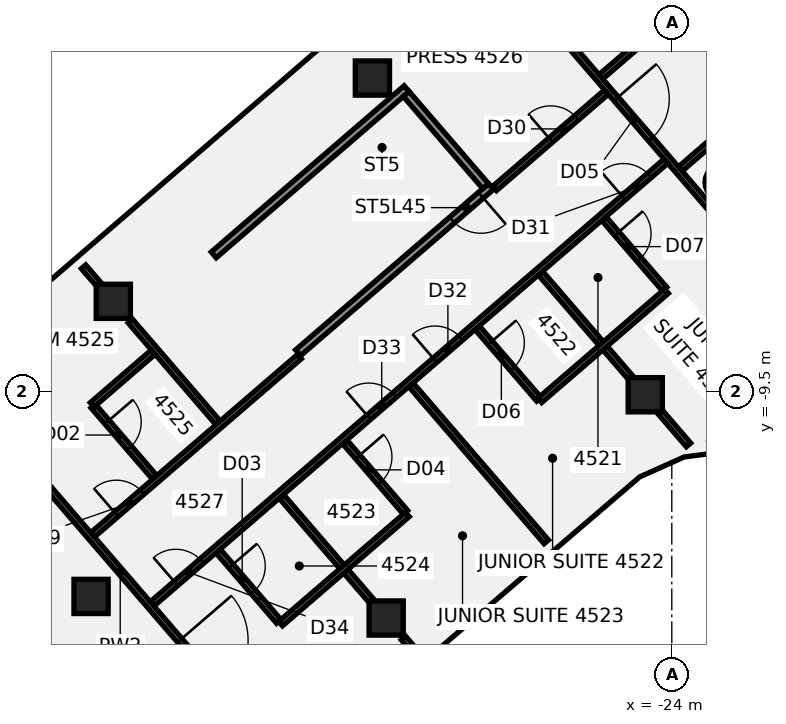
"""IFC4 building model, lengths in metres.
Left out: names, types, materials, properties, quantities, classifications, styles, units other than length and angle.
Written with IfcOpenShell. Run it as: python <this file> out.ifc"""

import sys

from ifc_helpers import new_model, si_unit, direction, frame, frame_2d, origin, origin_2d, place, context, subcontext, project, spatial, polyline, rectangle, circle, outline, extrude, element, fill, save


model = new_model("IFC4")
c1 = context("Model", 3, precision=1e-05, world=origin(), true_north=direction((0.0, 1.0)))
c2 = subcontext(c1, "Body", "Model", "MODEL_VIEW")
j1 = project(units=[si_unit("LENGTHUNIT", "METRE"), si_unit("PLANEANGLEUNIT", "RADIAN")], contexts=[c1])
p1 = place(None, origin())
s1 = spatial("IfcSite", under=j1, at=p1, CompositionType="ELEMENT")
p2 = place(p1, origin())
s2 = spatial("IfcBuilding", under=s1, at=p2, CompositionType="ELEMENT")
p3 = place(p2, frame((0.0, 0.0, 182.5)))
s3 = spatial("IfcBuildingStorey", under=s2, at=p3, CompositionType="ELEMENT", Elevation=182.5)
p4 = place(p3, frame((-22.651, -3.994, -0.14), z_axis=(0.0, 0.0, 1.0), x_axis=(1.0, 0.0, 0.0)))
e1 = element("IfcColumn", 1, at=p4, inside=s3, PredefinedType="COLUMN", context=c2, shape_type="SweptSolid", body=[
    extrude(circle(Radius=0.475, at=origin_2d()), origin(), (0.0, 0.0, 1.0), 3.6),
])
p5 = place(p3, frame((-31.516, -15.459, -0.133), z_axis=(0.07839124964, -0.047319070379, 0.995799034725), x_axis=(-0.649009542698, 0.755788776181, 0.087005398028)))
e2 = element("IfcColumn", 2, at=p5, inside=s3, PredefinedType="COLUMN", context=c2, shape_type="SweptSolid", body=[
    extrude(rectangle(XDim=0.9, YDim=0.9, at=origin_2d()), origin(), (0.0, 0.0, 1.0), 3.606),
])
p6 = place(p3, frame((-38.696, -7.126, -0.133), z_axis=(0.036686006843, -0.083863399406, 0.995801720797), x_axis=(0.758162598415, 0.651508924479, 0.026936883435)))
e3 = element("IfcColumn", 3, at=p6, inside=s3, PredefinedType="COLUMN", context=c2, shape_type="SweptSolid", body=[
    extrude(rectangle(XDim=0.9, YDim=0.9, at=origin_2d()), origin(), (0.0, 0.0, 1.0), 3.607),
])
p7 = place(p3, frame((-24.698, -9.584, -0.135), z_axis=(0.048576320124, -0.013229584391, 0.998731855515), x_axis=(-0.651247732409, 0.757717932984, 0.04171240903)))
e4 = element("IfcColumn", 4, at=p7, inside=s3, PredefinedType="COLUMN", context=c2, shape_type="SweptSolid", body=[
    extrude(rectangle(XDim=0.9, YDim=0.9, at=origin_2d()), origin(), (0.0, 0.0, 1.0), 3.599),
])
p8 = place(p3, frame((-31.878, -1.251, -0.135), z_axis=(0.006783926741, -0.049929700814, 0.99872969482), x_axis=(0.757710068374, 0.652013787216, 0.027449472935)))
e5 = element("IfcColumn", 5, at=p8, inside=s3, PredefinedType="COLUMN", context=c2, shape_type="SweptSolid", body=[
    extrude(rectangle(XDim=0.9, YDim=0.9, at=origin_2d()), origin(), (0.0, 0.0, 1.0), 3.599),
])
p9 = place(p3, frame((-39.281, -14.891, -0.126), z_axis=(0.12637463351, -0.040639705862, 0.99114976987), x_axis=(-0.645550569996, 0.755269902041, 0.113277697048)))
e6 = element("IfcColumn", 6, at=p9, inside=s3, PredefinedType="COLUMN", context=c2, shape_type="SweptSolid", body=[
    extrude(rectangle(XDim=0.9, YDim=0.9, at=origin_2d()), origin(), (0.0, 0.0, 1.0), 3.616),
])
p10 = place(p3, frame((-42.888, -9.154, 0.0), z_axis=(0.0, 0.0, 1.0), x_axis=(0.652715459728, -0.75760314719, 0.0)))
e7 = element("IfcWall", 7, at=p10, inside=s3, PredefinedType="PARTITIONING", context=c2, shape_type="SweptSolid", body=[
    extrude(rectangle(XDim=13.403, YDim=0.15, at=frame_2d((6.701, 0.0))), origin(), (0.0, 0.0, 1.0), 2.864),
])
p11 = place(p10, frame((9.099, 0.0, 0.0)))
e8 = element("IfcOpeningElement", 8, at=p11, cuts=e7, PredefinedType="OPENING", context=c2, shape_type="SweptSolid", body=[
    extrude(rectangle(XDim=1.8, YDim=2.1, at=frame_2d((0.9, 1.05))), frame((0.0, 0.085, 0.0), z_axis=(0.0, -1.0, 0.0), x_axis=(1.0, 0.0, 0.0)), (0.0, 0.0, 1.0), 0.17),
])
p12 = place(p3, frame((-39.479, -6.217, 0.0), z_axis=(0.0, 0.0, 1.0), x_axis=(0.652651234918, -0.757658475541, 0.0)))
e9 = element("IfcWall", 9, at=p12, inside=s3, PredefinedType="PARTITIONING", context=c2, shape_type="SweptSolid", body=[
    extrude(rectangle(XDim=0.821, YDim=0.15, at=frame_2d((0.41, 0.0))), origin(), (0.0, 0.0, 1.0), 2.864),
])
p13 = place(p3, frame((-38.248, -7.646, 0.0), z_axis=(0.0, 0.0, 1.0), x_axis=(0.652741368874, -0.757580824309, 0.0)))
e10 = element("IfcWall", 10, at=p13, inside=s3, PredefinedType="PARTITIONING", context=c2, shape_type="SweptSolid", body=[
    extrude(rectangle(XDim=3.533, YDim=0.15, at=frame_2d((1.766, 0.0))), origin(), (0.0, 0.0, 1.0), 2.864),
])
p14 = place(p3, frame((-34.271, -12.262, 0.0), z_axis=(0.0, 0.0, 1.0), x_axis=(0.652795291218, -0.757534360781, 0.0)))
e11 = element("IfcWall", 11, at=p14, inside=s3, PredefinedType="PARTITIONING", context=c2, shape_type="SweptSolid", body=[
    extrude(rectangle(XDim=3.848, YDim=0.15, at=frame_2d((1.924, 0.0))), origin(), (0.0, 0.0, 1.0), 2.864),
])
p15 = place(p3, frame((-31.063, -15.984, 0.0), z_axis=(0.0, 0.0, 1.0), x_axis=(0.652709025629, -0.757608690462, 0.0)))
e12 = element("IfcWall", 12, at=p15, inside=s3, PredefinedType="PARTITIONING", context=c2, shape_type="SweptSolid", body=[
    extrude(rectangle(XDim=0.524, YDim=0.15, at=frame_2d((0.262, 0.0))), origin(), (0.0, 0.0, 1.0), 2.864),
])
p16 = place(p3, frame((-39.227, -9.879, 0.0), z_axis=(0.0, 0.0, 1.0), x_axis=(0.652686423647, -0.757628162351, 0.0)))
e13 = element("IfcWall", 13, at=p16, inside=s3, PredefinedType="PARTITIONING", context=c2, shape_type="SweptSolid", body=[
    extrude(rectangle(XDim=2.48, YDim=0.15, at=frame_2d((1.24, 0.0))), origin(), (0.0, 0.0, 1.0), 2.864),
])
p17 = place(p16, frame((0.56, 0.0, 0.0)))
e14 = element("IfcOpeningElement", 14, at=p17, cuts=e13, PredefinedType="OPENING", context=c2, shape_type="SweptSolid", body=[
    extrude(rectangle(XDim=0.9, YDim=2.1, at=frame_2d((0.45, 1.05))), frame((0.0, 0.085, 0.0), z_axis=(0.0, -1.0, 0.0), x_axis=(1.0, 0.0, 0.0)), (0.0, 0.0, 1.0), 0.17),
])
p18 = place(p3, frame((-35.938, -13.698, 0.0), z_axis=(0.0, 0.0, 1.0), x_axis=(0.652688747073, -0.757626160745, 0.0)))
e15 = element("IfcWall", 15, at=p18, inside=s3, PredefinedType="PARTITIONING", context=c2, shape_type="SweptSolid", body=[
    extrude(rectangle(XDim=2.445, YDim=0.15, at=frame_2d((1.223, 0.0))), origin(), (0.0, 0.0, 1.0), 2.864),
])
p19 = place(p18, frame((0.52, 0.0, 0.0)))
e16 = element("IfcOpeningElement", 16, at=p19, cuts=e15, PredefinedType="OPENING", context=c2, shape_type="SweptSolid", body=[
    extrude(rectangle(XDim=0.9, YDim=2.1, at=frame_2d((0.45, 1.05))), frame((0.0, 0.085, 0.0), z_axis=(0.0, -1.0, 0.0), x_axis=(1.0, 0.0, 0.0)), (0.0, 0.0, 1.0), 0.17),
])
p20 = place(p3, frame((-32.604, -10.826, 0.0), z_axis=(0.0, 0.0, 1.0), x_axis=(0.652688747073, -0.757626160745, 0.0)))
e17 = element("IfcWall", 17, at=p20, inside=s3, PredefinedType="PARTITIONING", context=c2, shape_type="SweptSolid", body=[
    extrude(rectangle(XDim=2.445, YDim=0.15, at=frame_2d((1.223, 0.0))), origin(), (0.0, 0.0, 1.0), 2.864),
])
p21 = place(p20, frame((0.52, 0.0, 0.0)))
e18 = element("IfcOpeningElement", 18, at=p21, cuts=e17, PredefinedType="OPENING", context=c2, shape_type="SweptSolid", body=[
    extrude(rectangle(XDim=0.9, YDim=2.1, at=frame_2d((0.45, 1.05))), frame((0.0, 0.085, 0.0), z_axis=(0.0, -1.0, 0.0), x_axis=(1.0, 0.0, 0.0)), (0.0, 0.0, 1.0), 0.17),
])
p22 = place(p3, frame((-30.862, -9.325, 0.0), z_axis=(0.0, 0.0, 1.0), x_axis=(0.652740266832, -0.757581773841, 0.0)))
e19 = element("IfcWall", 19, at=p22, inside=s3, PredefinedType="PARTITIONING", context=c2, shape_type="SweptSolid", body=[
    extrude(rectangle(XDim=5.451, YDim=0.15, at=frame_2d((2.726, 0.0))), origin(), (0.0, 0.0, 1.0), 2.864),
])
p23 = place(p3, frame((-29.251, 2.595, 0.0), z_axis=(0.0, 0.0, 1.0), x_axis=(0.652713725704, -0.757604641141, 0.0)))
e20 = element("IfcWall", 20, at=p23, inside=s3, PredefinedType="PARTITIONING", context=c2, shape_type="SweptSolid", body=[
    extrude(rectangle(XDim=14.219, YDim=0.15, at=frame_2d((7.109, 0.0))), origin(), (0.0, 0.0, 1.0), 2.864),
])
p24 = place(p23, frame((5.799, 0.0, 0.0)))
e21 = element("IfcOpeningElement", 21, at=p24, cuts=e20, PredefinedType="OPENING", context=c2, shape_type="SweptSolid", body=[
    extrude(rectangle(XDim=1.4, YDim=2.1, at=frame_2d((0.7, 1.05))), frame((0.0, 0.085, 0.0), z_axis=(0.0, -1.0, 0.0), x_axis=(1.0, 0.0, 0.0)), (0.0, 0.0, 1.0), 0.17),
])
p25 = place(p3, frame((-29.119, -7.823, 0.0), z_axis=(0.0, 0.0, 1.0), x_axis=(0.652888980145, -0.757453615481, 0.0)))
e22 = element("IfcWall", 22, at=p25, inside=s3, PredefinedType="PARTITIONING", context=c2, shape_type="SweptSolid", body=[
    extrude(rectangle(XDim=2.479, YDim=0.15, at=frame_2d((1.24, 0.0))), origin(), (0.0, 0.0, 1.0), 2.864),
])
p26 = place(p25, frame((0.52, 0.0, 0.0)))
e23 = element("IfcOpeningElement", 23, at=p26, cuts=e22, PredefinedType="OPENING", context=c2, shape_type="SweptSolid", body=[
    extrude(rectangle(XDim=0.9, YDim=2.1, at=frame_2d((0.45, 1.05))), frame((0.0, 0.085, 0.0), z_axis=(0.0, -1.0, 0.0), x_axis=(1.0, 0.0, 0.0)), (0.0, 0.0, 1.0), 0.17),
])
p27 = place(p3, frame((-27.453, -6.388, 0.0), z_axis=(0.0, 0.0, 1.0), x_axis=(0.652892175674, -0.757450861075, 0.0)))
e24 = element("IfcWall", 24, at=p27, inside=s3, PredefinedType="PARTITIONING", context=c2, shape_type="SweptSolid", body=[
    extrude(rectangle(XDim=3.766, YDim=0.15, at=frame_2d((1.883, 0.0))), origin(), (0.0, 0.0, 1.0), 2.864),
])
p28 = place(p3, frame((-24.299, -10.048, 0.0), z_axis=(0.0, 0.0, 1.0), x_axis=(0.652995188074, -0.75736205632, 0.0)))
e25 = element("IfcWall", 25, at=p28, inside=s3, PredefinedType="PARTITIONING", context=c2, shape_type="SweptSolid", body=[
    extrude(rectangle(XDim=1.13, YDim=0.15, at=frame_2d((0.565, 0.0))), origin(), (0.0, 0.0, 1.0), 2.864),
])
p29 = place(p3, frame((-25.786, -4.952, 0.0), z_axis=(0.0, 0.0, 1.0), x_axis=(0.652886276294, -0.757455946063, 0.0)))
e26 = element("IfcWall", 26, at=p29, inside=s3, PredefinedType="PARTITIONING", context=c2, shape_type="SweptSolid", body=[
    extrude(rectangle(XDim=2.444, YDim=0.15, at=frame_2d((1.222, 0.0))), origin(), (0.0, 0.0, 1.0), 2.864),
])
p30 = place(p29, frame((0.52, 0.0, 0.0)))
e27 = element("IfcOpeningElement", 27, at=p30, cuts=e26, PredefinedType="OPENING", context=c2, shape_type="SweptSolid", body=[
    extrude(rectangle(XDim=0.9, YDim=2.1, at=frame_2d((0.45, 1.05))), frame((0.0, 0.085, 0.0), z_axis=(0.0, -1.0, 0.0), x_axis=(1.0, 0.0, 0.0)), (0.0, 0.0, 1.0), 0.17),
])
p31 = place(p3, frame((-39.238, -13.268, 0.0), z_axis=(0.0, 0.0, 1.0), x_axis=(0.757588514566, 0.652732443346, 0.0)))
e28 = element("IfcWall", 28, at=p31, inside=s3, PredefinedType="PARTITIONING", context=c2, shape_type="SweptSolid", body=[
    extrude(rectangle(XDim=7.181, YDim=0.15, at=frame_2d((3.59, 0.0))), origin(), (0.0, 0.0, 1.0), 2.864),
])
p32 = place(p31, frame((0.82, 0.0, 0.0)))
e29 = element("IfcOpeningElement", 29, at=p32, cuts=e28, PredefinedType="OPENING", context=c2, shape_type="SweptSolid", body=[
    extrude(rectangle(XDim=0.9, YDim=2.1, at=frame_2d((0.45, 1.05))), frame((0.0, 0.085, 0.0), z_axis=(0.0, -1.0, 0.0), x_axis=(1.0, 0.0, 0.0)), (0.0, 0.0, 1.0), 0.17),
])
p33 = place(p3, frame((-28.663, -4.156, 0.0), z_axis=(0.0, 0.0, 1.0), x_axis=(0.757628792985, 0.652685691615, 0.0)))
e30 = element("IfcWall", 30, at=p33, inside=s3, PredefinedType="PARTITIONING", context=c2, shape_type="SweptSolid", body=[
    extrude(rectangle(XDim=3.88, YDim=0.15, at=frame_2d((1.94, 0.0))), origin(), (0.0, 0.0, 1.0), 2.864),
])
p34 = place(p33, frame((1.95, 0.0, 0.0)))
e31 = element("IfcOpeningElement", 31, at=p34, cuts=e30, PredefinedType="OPENING", context=c2, shape_type="SweptSolid", body=[
    extrude(rectangle(XDim=0.9, YDim=2.1, at=frame_2d((0.45, 1.05))), frame((0.0, 0.085, 0.0), z_axis=(0.0, -1.0, 0.0), x_axis=(1.0, 0.0, 0.0)), (0.0, 0.0, 1.0), 0.17),
])
p35 = place(p3, frame((-39.253, -9.849, 0.0), z_axis=(0.0, 0.0, 1.0), x_axis=(0.757358886991, 0.652998863932, 0.0)))
e32 = element("IfcWall", 32, at=p35, inside=s3, PredefinedType="PARTITIONING", context=c2, shape_type="SweptSolid", body=[
    extrude(rectangle(XDim=2.119, YDim=0.15, at=frame_2d((1.06, 0.0))), origin(), (0.0, 0.0, 1.0), 2.864),
])
p36 = place(p3, frame((-37.671, -15.086, 0.0), z_axis=(0.0, 0.0, 1.0), x_axis=(0.757564439781, 0.652760384505, 0.0)))
e33 = element("IfcWall", 33, at=p36, inside=s3, PredefinedType="PARTITIONING", context=c2, shape_type="SweptSolid", body=[
    extrude(rectangle(XDim=17.839, YDim=0.15, at=frame_2d((8.92, 0.0))), origin(), (0.0, 0.0, 1.0), 2.864),
])
p37 = place(p36, frame((16.369, 0.0, 0.0)))
e34 = element("IfcOpeningElement", 34, at=p37, cuts=e33, PredefinedType="OPENING", context=c2, shape_type="SweptSolid", body=[
    extrude(rectangle(XDim=0.9, YDim=2.1, at=frame_2d((0.45, 1.05))), frame((0.0, 0.085, 0.0), z_axis=(0.0, -1.0, 0.0), x_axis=(1.0, 0.0, 0.0)), (0.0, 0.0, 1.0), 0.17),
])
p38 = place(p36, frame((9.819, 0.0, 0.0)))
e35 = element("IfcOpeningElement", 35, at=p38, cuts=e33, PredefinedType="OPENING", context=c2, shape_type="SweptSolid", body=[
    extrude(rectangle(XDim=0.9, YDim=2.1, at=frame_2d((0.45, 1.05))), frame((0.0, 0.085, 0.0), z_axis=(0.0, -1.0, 0.0), x_axis=(1.0, 0.0, 0.0)), (0.0, 0.0, 1.0), 0.17),
])
p39 = place(p36, frame((7.52, 0.0, 0.0)))
e36 = element("IfcOpeningElement", 36, at=p39, cuts=e33, PredefinedType="OPENING", context=c2, shape_type="SweptSolid", body=[
    extrude(rectangle(XDim=0.9, YDim=2.1, at=frame_2d((0.45, 1.05))), frame((0.0, 0.085, 0.0), z_axis=(0.0, -1.0, 0.0), x_axis=(1.0, 0.0, 0.0)), (0.0, 0.0, 1.0), 0.17),
])
p40 = place(p36, frame((0.82, 0.0, 0.0)))
e37 = element("IfcOpeningElement", 37, at=p40, cuts=e33, PredefinedType="OPENING", context=c2, shape_type="SweptSolid", body=[
    extrude(rectangle(XDim=0.9, YDim=2.1, at=frame_2d((0.45, 1.05))), frame((0.0, 0.085, 0.0), z_axis=(0.0, -1.0, 0.0), x_axis=(1.0, 0.0, 0.0)), (0.0, 0.0, 1.0), 0.17),
])
p41 = place(p3, frame((-34.293, -15.607, 0.0), z_axis=(0.0, 0.0, 1.0), x_axis=(0.757668202235, 0.652639943094, 0.0)))
e38 = element("IfcWall", 38, at=p41, inside=s3, PredefinedType="PARTITIONING", context=c2, shape_type="SweptSolid", body=[
    extrude(rectangle(XDim=4.4, YDim=0.15, at=frame_2d((2.2, 0.0))), origin(), (0.0, 0.0, 1.0), 2.864),
])
p42 = place(p3, frame((-27.473, -9.732, 0.0), z_axis=(0.0, 0.0, 1.0), x_axis=(0.757652172853, 0.652658551595, 0.0)))
e39 = element("IfcWall", 39, at=p42, inside=s3, PredefinedType="PARTITIONING", context=c2, shape_type="SweptSolid", body=[
    extrude(rectangle(XDim=4.399, YDim=0.15, at=frame_2d((2.2, 0.0))), origin(), (0.0, 0.0, 1.0), 2.864),
])
p43 = place(p3, frame((-25.862, -1.216, 0.0), z_axis=(0.0, 0.0, 1.0), x_axis=(0.757576468923, 0.652746423762, 0.0)))
e40 = element("IfcWall", 40, at=p43, inside=s3, PredefinedType="PARTITIONING", context=c2, shape_type="SweptSolid", body=[
    extrude(rectangle(XDim=9.05, YDim=0.15, at=frame_2d((4.525, 0.0))), origin(), (0.0, 0.0, 1.0), 2.864),
])
p44 = place(p43, frame((5.17, 0.0, 0.0)))
e41 = element("IfcOpeningElement", 41, at=p44, cuts=e40, PredefinedType="OPENING", context=c2, shape_type="SweptSolid", body=[
    extrude(rectangle(XDim=0.9, YDim=2.1, at=frame_2d((0.45, 1.05))), frame((0.0, 0.085, 0.0), z_axis=(0.0, -1.0, 0.0), x_axis=(1.0, 0.0, 0.0)), (0.0, 0.0, 1.0), 0.17),
])
p45 = place(p3, frame((-23.774, -3.641, 0.0), z_axis=(0.0, 0.0, 1.0), x_axis=(0.757583902186, 0.65273779663, 0.0)))
e42 = element("IfcWall", 42, at=p45, inside=s3, PredefinedType="PARTITIONING", context=c2, shape_type="SweptSolid", body=[
    extrude(rectangle(XDim=6.294, YDim=0.15, at=frame_2d((3.147, 0.0))), origin(), (0.0, 0.0, 1.0), 2.864),
])
p46 = place(p3, frame((-28.758, -4.106, -0.14), z_axis=(0.0, 0.0, 1.0), x_axis=(-0.757613125952, -0.652703877257, 0.0)))
e43 = element("IfcWall", 43, at=p46, inside=s3, PredefinedType="SHEAR", context=c2, shape_type="SweptSolid", body=[
    extrude(rectangle(XDim=6.7, YDim=0.2, at=frame_2d((3.35, 0.0))), origin(), (0.0, 0.0, 1.0), 3.004),
])
p47 = place(p46, frame((0.35, 0.0, 0.0)))
e44 = element("IfcOpeningElement", 44, at=p47, cuts=e43, PredefinedType="OPENING", context=c2, shape_type="SweptSolid", body=[
    extrude(rectangle(XDim=1.0, YDim=2.1, at=frame_2d((0.5, 1.05))), frame((0.0, 0.11, 0.0), z_axis=(0.0, -1.0, 0.0), x_axis=(1.0, 0.0, 0.0)), (0.0, 0.0, 1.0), 0.22),
])
p48 = place(p3, frame((-30.977, -1.531, -0.14), z_axis=(0.0, 0.0, 1.0), x_axis=(-0.757595106879, -0.652724791955, 0.0)))
e45 = element("IfcWall", 45, at=p48, inside=s3, PredefinedType="SHEAR", context=c2, shape_type="SweptSolid", body=[
    extrude(rectangle(XDim=6.7, YDim=0.2, at=frame_2d((3.35, 0.0))), origin(), (0.0, 0.0, 1.0), 3.004),
])
p49 = place(p3, frame((-30.988, -1.672, -0.14), z_axis=(0.0, 0.0, 1.0), x_axis=(0.652749445371, -0.75757386542, 0.0)))
e46 = element("IfcWall", 46, at=p49, inside=s3, PredefinedType="SHEAR", context=c2, shape_type="SweptSolid", body=[
    extrude(rectangle(XDim=3.2, YDim=0.2, at=frame_2d((1.6, 0.0))), origin(), (0.0, 0.0, 1.0), 3.004),
])
p50 = place(p3, frame((0.0, 0.0, -0.14)))
e47 = element("IfcWall", 47, at=p50, inside=s3, PredefinedType="SHEAR", context=c2, shape_type="SweptSolid", body=[
    extrude(outline(polyline([(-35.836, -5.849), (-35.988, -5.979), (-33.899, -8.404), (-33.747, -8.273), (-35.836, -5.849)])), origin(), (0.0, 0.0, 1.0), 3.004),
])
p51 = place(p11, frame((1.8, 0.0, 0.0), z_axis=(0.0, 0.0, 1.0), x_axis=(-1.0, 0.0, 0.0)))
e48 = element("IfcDoor", 48, at=p51, inside=s3, OperationType="DOUBLE_DOOR_SINGLE_SWING", PredefinedType="DOOR", context=c2, shape_type="SweptSolid", body=[
    extrude(rectangle(XDim=1.8, YDim=2.1, at=frame_2d((0.9, 1.05))), frame((0.0, 0.025, 0.0), z_axis=(0.0, -1.0, 0.0), x_axis=(1.0, 0.0, 0.0)), (0.0, 0.0, 1.0), 0.05),
])
fill(e8, e48)
p52 = place(p17, origin())
e49 = element("IfcDoor", 49, at=p52, inside=s3, OperationType="SINGLE_SWING_RIGHT", PredefinedType="DOOR", context=c2, shape_type="SweptSolid", body=[
    extrude(rectangle(XDim=0.9, YDim=2.1, at=frame_2d((0.45, 1.05))), frame((0.0, 0.025, 0.0), z_axis=(0.0, -1.0, 0.0), x_axis=(1.0, 0.0, 0.0)), (0.0, 0.0, 1.0), 0.05),
])
fill(e14, e49)
p53 = place(p19, origin())
e50 = element("IfcDoor", 50, at=p53, inside=s3, OperationType="SINGLE_SWING_RIGHT", PredefinedType="DOOR", context=c2, shape_type="SweptSolid", body=[
    extrude(rectangle(XDim=0.9, YDim=2.1, at=frame_2d((0.45, 1.05))), frame((0.0, 0.025, 0.0), z_axis=(0.0, -1.0, 0.0), x_axis=(1.0, 0.0, 0.0)), (0.0, 0.0, 1.0), 0.05),
])
fill(e16, e50)
p54 = place(p21, frame((0.9, 0.0, 0.0), z_axis=(0.0, 0.0, 1.0), x_axis=(-1.0, 0.0, 0.0)))
e51 = element("IfcDoor", 51, at=p54, inside=s3, OperationType="SINGLE_SWING_LEFT", PredefinedType="DOOR", context=c2, shape_type="SweptSolid", body=[
    extrude(rectangle(XDim=0.9, YDim=2.1, at=frame_2d((0.45, 1.05))), frame((0.0, 0.025, 0.0), z_axis=(0.0, -1.0, 0.0), x_axis=(1.0, 0.0, 0.0)), (0.0, 0.0, 1.0), 0.05),
])
fill(e18, e51)
p55 = place(p24, origin())
e52 = element("IfcDoor", 52, at=p55, inside=s3, OperationType="DOUBLE_DOOR_SINGLE_SWING", PredefinedType="DOOR", context=c2, shape_type="SweptSolid", body=[
    extrude(rectangle(XDim=1.4, YDim=2.1, at=frame_2d((0.7, 1.05))), frame((0.0, 0.025, 0.0), z_axis=(0.0, -1.0, 0.0), x_axis=(1.0, 0.0, 0.0)), (0.0, 0.0, 1.0), 0.05),
])
fill(e21, e52)
p56 = place(p26, origin())
e53 = element("IfcDoor", 53, at=p56, inside=s3, OperationType="SINGLE_SWING_RIGHT", PredefinedType="DOOR", context=c2, shape_type="SweptSolid", body=[
    extrude(rectangle(XDim=0.9, YDim=2.1, at=frame_2d((0.45, 1.05))), frame((0.0, 0.025, 0.0), z_axis=(0.0, -1.0, 0.0), x_axis=(1.0, 0.0, 0.0)), (0.0, 0.0, 1.0), 0.05),
])
fill(e23, e53)
p57 = place(p30, frame((0.9, 0.0, 0.0), z_axis=(0.0, 0.0, 1.0), x_axis=(-1.0, 0.0, 0.0)))
e54 = element("IfcDoor", 54, at=p57, inside=s3, OperationType="SINGLE_SWING_LEFT", PredefinedType="DOOR", context=c2, shape_type="SweptSolid", body=[
    extrude(rectangle(XDim=0.9, YDim=2.1, at=frame_2d((0.45, 1.05))), frame((0.0, 0.025, 0.0), z_axis=(0.0, -1.0, 0.0), x_axis=(1.0, 0.0, 0.0)), (0.0, 0.0, 1.0), 0.05),
])
fill(e27, e54)
p58 = place(p32, origin())
e55 = element("IfcDoor", 55, at=p58, inside=s3, OperationType="SINGLE_SWING_RIGHT", PredefinedType="DOOR", context=c2, shape_type="SweptSolid", body=[
    extrude(rectangle(XDim=0.9, YDim=2.1, at=frame_2d((0.45, 1.05))), frame((0.0, 0.025, 0.0), z_axis=(0.0, -1.0, 0.0), x_axis=(1.0, 0.0, 0.0)), (0.0, 0.0, 1.0), 0.05),
])
fill(e29, e55)
p59 = place(p34, origin())
e56 = element("IfcDoor", 56, at=p59, inside=s3, OperationType="SINGLE_SWING_LEFT", PredefinedType="DOOR", context=c2, shape_type="SweptSolid", body=[
    extrude(rectangle(XDim=0.9, YDim=2.1, at=frame_2d((0.45, 1.05))), frame((0.0, 0.025, 0.0), z_axis=(0.0, -1.0, 0.0), x_axis=(1.0, 0.0, 0.0)), (0.0, 0.0, 1.0), 0.05),
])
fill(e31, e56)
p60 = place(p37, frame((0.9, 0.0, 0.0), z_axis=(0.0, 0.0, 1.0), x_axis=(-1.0, 0.0, 0.0)))
e57 = element("IfcDoor", 57, at=p60, inside=s3, OperationType="SINGLE_SWING_RIGHT", PredefinedType="DOOR", context=c2, shape_type="SweptSolid", body=[
    extrude(rectangle(XDim=0.9, YDim=2.1, at=frame_2d((0.45, 1.05))), frame((0.0, 0.025, 0.0), z_axis=(0.0, -1.0, 0.0), x_axis=(1.0, 0.0, 0.0)), (0.0, 0.0, 1.0), 0.05),
])
fill(e34, e57)
p61 = place(p38, frame((0.9, 0.0, 0.0), z_axis=(0.0, 0.0, 1.0), x_axis=(-1.0, 0.0, 0.0)))
e58 = element("IfcDoor", 58, at=p61, inside=s3, OperationType="SINGLE_SWING_RIGHT", PredefinedType="DOOR", context=c2, shape_type="SweptSolid", body=[
    extrude(rectangle(XDim=0.9, YDim=2.1, at=frame_2d((0.45, 1.05))), frame((0.0, 0.025, 0.0), z_axis=(0.0, -1.0, 0.0), x_axis=(1.0, 0.0, 0.0)), (0.0, 0.0, 1.0), 0.05),
])
fill(e35, e58)
p62 = place(p39, frame((0.9, 0.0, 0.0), z_axis=(0.0, 0.0, 1.0), x_axis=(-1.0, 0.0, 0.0)))
e59 = element("IfcDoor", 59, at=p62, inside=s3, OperationType="SINGLE_SWING_LEFT", PredefinedType="DOOR", context=c2, shape_type="SweptSolid", body=[
    extrude(rectangle(XDim=0.9, YDim=2.1, at=frame_2d((0.45, 1.05))), frame((0.0, 0.025, 0.0), z_axis=(0.0, -1.0, 0.0), x_axis=(1.0, 0.0, 0.0)), (0.0, 0.0, 1.0), 0.05),
])
fill(e36, e59)
p63 = place(p40, frame((0.9, 0.0, 0.0), z_axis=(0.0, 0.0, 1.0), x_axis=(-1.0, 0.0, 0.0)))
e60 = element("IfcDoor", 60, at=p63, inside=s3, OperationType="SINGLE_SWING_LEFT", PredefinedType="DOOR", context=c2, shape_type="SweptSolid", body=[
    extrude(rectangle(XDim=0.9, YDim=2.1, at=frame_2d((0.45, 1.05))), frame((0.0, 0.025, 0.0), z_axis=(0.0, -1.0, 0.0), x_axis=(1.0, 0.0, 0.0)), (0.0, 0.0, 1.0), 0.05),
])
fill(e37, e60)
p64 = place(p47, origin())
e61 = element("IfcDoor", 61, at=p64, inside=s3, OperationType="SINGLE_SWING_LEFT", PredefinedType="DOOR", context=c2, shape_type="SweptSolid", body=[
    extrude(rectangle(XDim=1.0, YDim=2.1, at=frame_2d((0.5, 1.05))), frame((0.0, 0.025, 0.0), z_axis=(0.0, -1.0, 0.0), x_axis=(1.0, 0.0, 0.0)), (0.0, 0.0, 1.0), 0.05),
])
fill(e44, e61)
save(model, sys.argv[1])
